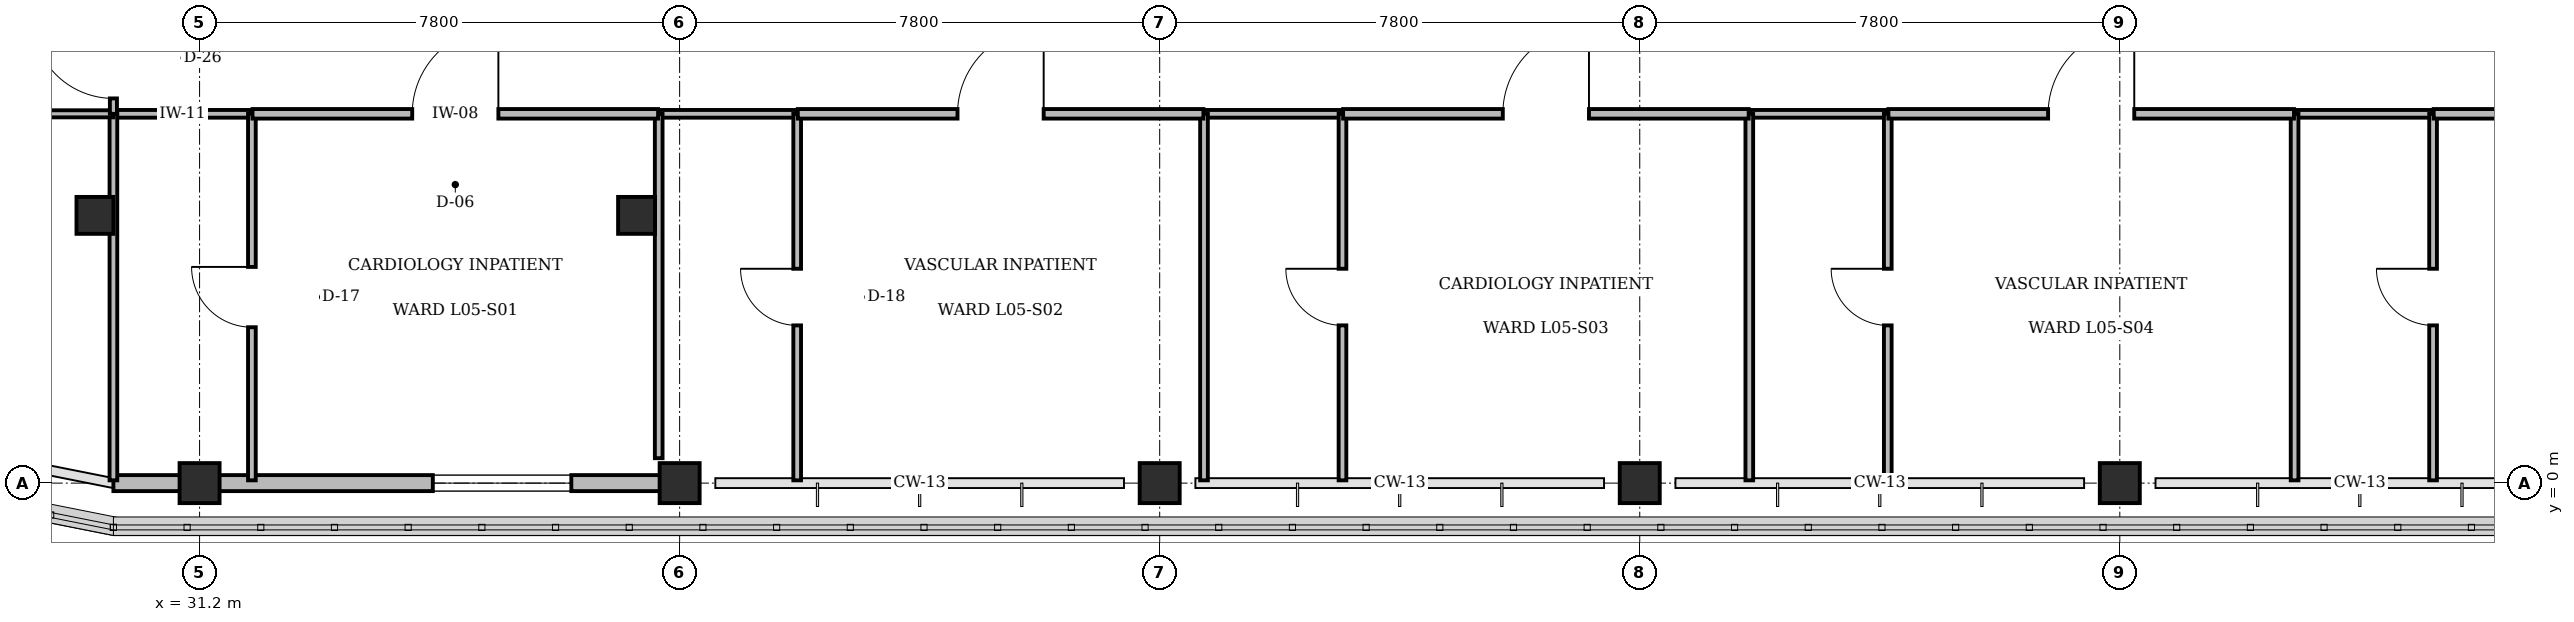
"""IFC4 building model, lengths in metres.
Left out: names, types, materials, properties, quantities, classifications, styles, units other than length and angle.
Written with IfcOpenShell. Run it as: python <this file> out.ifc"""

import sys

from ifc_helpers import new_model, si_unit, direction, frame, frame_2d, origin, origin_2d, place, context, subcontext, project, spatial, rectangle, circle, extrude, element, fill, save


model = new_model("IFC4")
c1 = context("Model", 3, precision=1e-05, world=origin(), true_north=direction((0.0, 1.0)))
c2 = subcontext(c1, "Body", "Model", "MODEL_VIEW")
j1 = project(units=[si_unit("LENGTHUNIT", "METRE"), si_unit("PLANEANGLEUNIT", "RADIAN")], contexts=[c1])
p1 = place(None, origin())
s1 = spatial("IfcSite", under=j1, at=p1, CompositionType="ELEMENT")
p2 = place(p1, origin())
s2 = spatial("IfcBuilding", under=s1, at=p2, CompositionType="ELEMENT")
p3 = place(p2, frame((0.0, 0.0, 22.2)))
s3 = spatial("IfcBuildingStorey", under=s2, at=p3, CompositionType="ELEMENT", Elevation=22.2)
for number, where, z_axis, x_axis in (
    (1, (31.2, 0.0, 0.0), (0.0, 0.0, 1.0), (1.0, 0.0, 0.0)),
    (2, (39.0, 0.0, 0.0), (0.0, 0.0, 1.0), (1.0, 0.0, 0.0)),
    (3, (46.8, 0.0, 0.0), (0.0, 0.0, 1.0), (1.0, 0.0, 0.0)),
    (4, (54.6, 0.0, 0.0), (0.0, 0.0, 1.0), (1.0, 0.0, 0.0)),
    (5, (62.4, 0.0, 0.0), (0.0, 0.0, 1.0), (1.0, 0.0, 0.0)),
):
    element("IfcColumn", number, at=place(p3, frame(where, z_axis=z_axis, x_axis=x_axis)), inside=s3, PredefinedType="COLUMN", context=c2, shape_type="SweptSolid", body=[
        extrude(rectangle(XDim=0.65, YDim=0.65, at=origin_2d()), origin(), (0.0, 0.0, 1.0), 4.2),
    ])
for number, where, z_axis, x_axis in (
    (6, (29.5, 4.35, 0.0), (0.0, 0.0, 1.0), (1.0, 0.0, 0.0)),
    (7, (38.3, 4.35, 0.0), (0.0, 0.0, 1.0), (1.0, 0.0, 0.0)),
):
    element("IfcColumn", number, at=place(p3, frame(where, z_axis=z_axis, x_axis=x_axis)), inside=s3, PredefinedType="PILASTER", context=c2, shape_type="SweptSolid", body=[
        extrude(circle(Radius=0.3, at=origin_2d()), origin(), (0.0, 0.0, 1.0), 4.2),
    ])
p4 = place(p3, frame((38.71, 0.0, 0.0), z_axis=(0.0, 0.0, 1.0), x_axis=(-1.0, 0.0, 0.0)))
e8 = element("IfcWall", 8, at=p4, inside=s3, PredefinedType="STANDARD", context=c2, shape_type="SweptSolid", body=[
    extrude(rectangle(XDim=8.91, YDim=0.26, at=frame_2d((4.455, 0.0))), origin(), (0.0, 0.0, 1.0), 2.805),
])
p5 = place(p4, frame((1.47, 0.0, 0.85)))
e9 = element("IfcOpeningElement", 9, at=p5, cuts=e8, PredefinedType="OPENING", context=c2, shape_type="SweptSolid", body=[
    extrude(rectangle(XDim=2.25, YDim=1.45, at=frame_2d((1.125, 0.725))), frame((0.0, 0.14, 0.0), z_axis=(0.0, -1.0, 0.0), x_axis=(1.0, 0.0, 0.0)), (0.0, 0.0, 1.0), 0.28),
])
p6 = place(p3, frame((29.8, 6.0, 0.0), z_axis=(0.0, 0.0, 1.0), x_axis=(1.0, 0.0, 0.0)))
e10 = element("IfcWall", 10, at=p6, inside=s3, PredefinedType="PARTITIONING", context=c2, shape_type="SweptSolid", body=[
    extrude(rectangle(XDim=2.25, YDim=0.125, at=frame_2d((1.125, 0.0))), origin(), (0.0, 0.0, 1.0), 3.9),
])
p7 = place(p3, frame((29.8, 0.045, 0.0), z_axis=(0.0, 0.0, 1.0), x_axis=(0.0, 1.0, 0.0)))
e11 = element("IfcWall", 11, at=p7, inside=s3, PredefinedType="PARTITIONING", context=c2, shape_type="SweptSolid", body=[
    extrude(rectangle(XDim=5.955, YDim=0.125, at=frame_2d((2.978, 0.0))), origin(), (0.0, 0.0, 1.0), 3.9),
])
p8 = place(p3, frame((32.05, 0.045, 0.0), z_axis=(0.0, 0.0, 1.0), x_axis=(0.0, 1.0, 0.0)))
e12 = element("IfcWall", 12, at=p8, inside=s3, PredefinedType="PARTITIONING", context=c2, shape_type="SweptSolid", body=[
    extrude(rectangle(XDim=5.955, YDim=0.125, at=frame_2d((2.978, 0.0))), origin(), (0.0, 0.0, 1.0), 3.9),
])
p9 = place(p8, frame((2.488, 0.0, 0.0)))
e13 = element("IfcOpeningElement", 13, at=p9, cuts=e12, PredefinedType="OPENING", context=c2, shape_type="SweptSolid", body=[
    extrude(rectangle(XDim=0.98, YDim=2.1, at=frame_2d((0.49, 1.05))), frame((0.0, 0.073, 0.0), z_axis=(0.0, -1.0, 0.0), x_axis=(1.0, 0.0, 0.0)), (0.0, 0.0, 1.0), 0.145),
])
p10 = place(p3, frame((38.66, 6.0, 0.0), z_axis=(0.0, 0.0, 1.0), x_axis=(1.0, 0.0, 0.0)))
e14 = element("IfcWall", 14, at=p10, inside=s3, PredefinedType="PARTITIONING", context=c2, shape_type="SweptSolid", body=[
    extrude(rectangle(XDim=2.25, YDim=0.125, at=frame_2d((1.125, 0.0))), origin(), (0.0, 0.0, 1.0), 3.9),
])
p11 = place(p3, frame((38.66, 0.405, 0.0), z_axis=(0.0, 0.0, 1.0), x_axis=(0.0, 1.0, 0.0)))
e15 = element("IfcWall", 15, at=p11, inside=s3, PredefinedType="PARTITIONING", context=c2, shape_type="SweptSolid", body=[
    extrude(rectangle(XDim=5.595, YDim=0.125, at=frame_2d((2.797, 0.0))), origin(), (0.0, 0.0, 1.0), 3.27),
])
p12 = place(p3, frame((40.91, 0.045, 0.0), z_axis=(0.0, 0.0, 1.0), x_axis=(0.0, 1.0, 0.0)))
e16 = element("IfcWall", 16, at=p12, inside=s3, PredefinedType="PARTITIONING", context=c2, shape_type="SweptSolid", body=[
    extrude(rectangle(XDim=5.955, YDim=0.125, at=frame_2d((2.978, 0.0))), origin(), (0.0, 0.0, 1.0), 3.9),
])
p13 = place(p12, frame((2.518, 0.0, 0.0)))
e17 = element("IfcOpeningElement", 17, at=p13, cuts=e16, PredefinedType="OPENING", context=c2, shape_type="SweptSolid", body=[
    extrude(rectangle(XDim=0.92, YDim=2.1, at=frame_2d((0.46, 1.05))), frame((0.0, 0.073, 0.0), z_axis=(0.0, -1.0, 0.0), x_axis=(1.0, 0.0, 0.0)), (0.0, 0.0, 1.0), 0.145),
])
p14 = place(p3, frame((47.52, 6.0, 0.0), z_axis=(0.0, 0.0, 1.0), x_axis=(1.0, 0.0, 0.0)))
e18 = element("IfcWall", 18, at=p14, inside=s3, PredefinedType="PARTITIONING", context=c2, shape_type="SweptSolid", body=[
    extrude(rectangle(XDim=2.25, YDim=0.125, at=frame_2d((1.125, 0.0))), origin(), (0.0, 0.0, 1.0), 3.9),
])
p15 = place(p3, frame((47.52, 0.045, 0.0), z_axis=(0.0, 0.0, 1.0), x_axis=(0.0, 1.0, 0.0)))
e19 = element("IfcWall", 19, at=p15, inside=s3, PredefinedType="PARTITIONING", context=c2, shape_type="SweptSolid", body=[
    extrude(rectangle(XDim=5.955, YDim=0.125, at=frame_2d((2.978, 0.0))), origin(), (0.0, 0.0, 1.0), 3.9),
])
p16 = place(p3, frame((49.77, 0.045, 0.0), z_axis=(0.0, 0.0, 1.0), x_axis=(0.0, 1.0, 0.0)))
e20 = element("IfcWall", 20, at=p16, inside=s3, PredefinedType="PARTITIONING", context=c2, shape_type="SweptSolid", body=[
    extrude(rectangle(XDim=5.955, YDim=0.125, at=frame_2d((2.978, 0.0))), origin(), (0.0, 0.0, 1.0), 3.9),
])
p17 = place(p16, frame((2.518, 0.0, 0.0)))
e21 = element("IfcOpeningElement", 21, at=p17, cuts=e20, PredefinedType="OPENING", context=c2, shape_type="SweptSolid", body=[
    extrude(rectangle(XDim=0.92, YDim=2.1, at=frame_2d((0.46, 1.05))), frame((0.0, 0.073, 0.0), z_axis=(0.0, -1.0, 0.0), x_axis=(1.0, 0.0, 0.0)), (0.0, 0.0, 1.0), 0.145),
])
p18 = place(p3, frame((56.38, 6.0, 0.0), z_axis=(0.0, 0.0, 1.0), x_axis=(1.0, 0.0, 0.0)))
e22 = element("IfcWall", 22, at=p18, inside=s3, PredefinedType="PARTITIONING", context=c2, shape_type="SweptSolid", body=[
    extrude(rectangle(XDim=2.25, YDim=0.125, at=frame_2d((1.125, 0.0))), origin(), (0.0, 0.0, 1.0), 3.9),
])
p19 = place(p3, frame((56.38, 0.045, 0.0), z_axis=(0.0, 0.0, 1.0), x_axis=(0.0, 1.0, 0.0)))
e23 = element("IfcWall", 23, at=p19, inside=s3, PredefinedType="PARTITIONING", context=c2, shape_type="SweptSolid", body=[
    extrude(rectangle(XDim=5.955, YDim=0.125, at=frame_2d((2.978, 0.0))), origin(), (0.0, 0.0, 1.0), 3.9),
])
p20 = place(p3, frame((58.63, 0.045, 0.0), z_axis=(0.0, 0.0, 1.0), x_axis=(0.0, 1.0, 0.0)))
e24 = element("IfcWall", 24, at=p20, inside=s3, PredefinedType="PARTITIONING", context=c2, shape_type="SweptSolid", body=[
    extrude(rectangle(XDim=5.955, YDim=0.125, at=frame_2d((2.978, 0.0))), origin(), (0.0, 0.0, 1.0), 3.9),
])
p21 = place(p20, frame((2.518, 0.0, 0.0)))
e25 = element("IfcOpeningElement", 25, at=p21, cuts=e24, PredefinedType="OPENING", context=c2, shape_type="SweptSolid", body=[
    extrude(rectangle(XDim=0.92, YDim=2.1, at=frame_2d((0.46, 1.05))), frame((0.0, 0.073, 0.0), z_axis=(0.0, -1.0, 0.0), x_axis=(1.0, 0.0, 0.0)), (0.0, 0.0, 1.0), 0.145),
])
p22 = place(p3, frame((65.24, 6.0, 0.0), z_axis=(0.0, 0.0, 1.0), x_axis=(1.0, 0.0, 0.0)))
e26 = element("IfcWall", 26, at=p22, inside=s3, PredefinedType="PARTITIONING", context=c2, shape_type="SweptSolid", body=[
    extrude(rectangle(XDim=2.25, YDim=0.125, at=frame_2d((1.125, 0.0))), origin(), (0.0, 0.0, 1.0), 3.9),
])
p23 = place(p3, frame((65.24, 0.045, 0.0), z_axis=(0.0, 0.0, 1.0), x_axis=(0.0, 1.0, 0.0)))
e27 = element("IfcWall", 27, at=p23, inside=s3, PredefinedType="PARTITIONING", context=c2, shape_type="SweptSolid", body=[
    extrude(rectangle(XDim=5.955, YDim=0.125, at=frame_2d((2.978, 0.0))), origin(), (0.0, 0.0, 1.0), 3.9),
])
p24 = place(p3, frame((67.49, 0.045, 0.0), z_axis=(0.0, 0.0, 1.0), x_axis=(0.0, 1.0, 0.0)))
e28 = element("IfcWall", 28, at=p24, inside=s3, PredefinedType="PARTITIONING", context=c2, shape_type="SweptSolid", body=[
    extrude(rectangle(XDim=5.955, YDim=0.125, at=frame_2d((2.978, 0.0))), origin(), (0.0, 0.0, 1.0), 3.9),
])
p25 = place(p24, frame((2.518, 0.0, 0.0)))
e29 = element("IfcOpeningElement", 29, at=p25, cuts=e28, PredefinedType="OPENING", context=c2, shape_type="SweptSolid", body=[
    extrude(rectangle(XDim=0.92, YDim=2.1, at=frame_2d((0.46, 1.05))), frame((0.0, 0.073, 0.0), z_axis=(0.0, -1.0, 0.0), x_axis=(1.0, 0.0, 0.0)), (0.0, 0.0, 1.0), 0.145),
])
p26 = place(p3, frame((17.7, 6.0, 0.0), z_axis=(0.0, 0.0, 1.0), x_axis=(1.0, 0.0, 0.0)))
e30 = element("IfcWall", 30, at=p26, inside=s3, PredefinedType="PARTITIONING", context=c2, shape_type="SweptSolid", body=[
    extrude(rectangle(XDim=12.1, YDim=0.115, at=frame_2d((6.05, 0.0))), origin(), (0.0, 0.0, 1.0), 3.9),
])
p27 = place(p3, frame((29.8, 6.0, 0.0), z_axis=(0.0, 0.0, 1.0), x_axis=(0.0, 1.0, 0.0)))
e31 = element("IfcWall", 31, at=p27, inside=s3, PredefinedType="PARTITIONING", context=c2, shape_type="SweptSolid", body=[
    extrude(rectangle(XDim=13.2, YDim=0.115, at=frame_2d((6.6, 0.0))), origin(), (0.0, 0.0, 1.0), 3.9),
])
p28 = place(p27, frame((0.25, 0.0, 0.0)))
e32 = element("IfcOpeningElement", 32, at=p28, cuts=e31, PredefinedType="OPENING", context=c2, shape_type="SweptSolid", body=[
    extrude(rectangle(XDim=1.32, YDim=2.15, at=frame_2d((0.66, 1.075))), frame((0.0, 0.067, 0.0), z_axis=(0.0, -1.0, 0.0), x_axis=(1.0, 0.0, 0.0)), (0.0, 0.0, 1.0), 0.135),
])
p29 = place(p3, frame((32.06, 6.0, 0.0), z_axis=(0.0, 0.0, 1.0), x_axis=(1.0, 0.0, 0.0)))
e33 = element("IfcWall", 33, at=p29, inside=s3, PredefinedType="PARTITIONING", context=c2, shape_type="SweptSolid", body=[
    extrude(rectangle(XDim=6.59, YDim=0.155, at=frame_2d((3.295, 0.0))), origin(), (0.0, 0.0, 1.0), 3.9),
])
p30 = place(p29, frame((2.595, 0.0, 0.0)))
e34 = element("IfcOpeningElement", 34, at=p30, cuts=e33, PredefinedType="OPENING", context=c2, shape_type="SweptSolid", body=[
    extrude(rectangle(XDim=1.4, YDim=2.2, at=frame_2d((0.7, 1.1))), frame((0.0, 0.087, 0.0), z_axis=(0.0, -1.0, 0.0), x_axis=(1.0, 0.0, 0.0)), (0.0, 0.0, 1.0), 0.175),
])
p31 = place(p3, frame((40.92, 6.0, 0.0), z_axis=(0.0, 0.0, 1.0), x_axis=(1.0, 0.0, 0.0)))
e35 = element("IfcWall", 35, at=p31, inside=s3, PredefinedType="PARTITIONING", context=c2, shape_type="SweptSolid", body=[
    extrude(rectangle(XDim=6.59, YDim=0.155, at=frame_2d((3.295, 0.0))), origin(), (0.0, 0.0, 1.0), 3.9),
])
p32 = place(p31, frame((2.595, 0.0, 0.0)))
e36 = element("IfcOpeningElement", 36, at=p32, cuts=e35, PredefinedType="OPENING", context=c2, shape_type="SweptSolid", body=[
    extrude(rectangle(XDim=1.4, YDim=2.2, at=frame_2d((0.7, 1.1))), frame((0.0, 0.087, 0.0), z_axis=(0.0, -1.0, 0.0), x_axis=(1.0, 0.0, 0.0)), (0.0, 0.0, 1.0), 0.175),
])
p33 = place(p3, frame((49.78, 6.0, 0.0), z_axis=(0.0, 0.0, 1.0), x_axis=(1.0, 0.0, 0.0)))
e37 = element("IfcWall", 37, at=p33, inside=s3, PredefinedType="PARTITIONING", context=c2, shape_type="SweptSolid", body=[
    extrude(rectangle(XDim=6.59, YDim=0.155, at=frame_2d((3.295, 0.0))), origin(), (0.0, 0.0, 1.0), 3.9),
])
p34 = place(p33, frame((2.595, 0.0, 0.0)))
e38 = element("IfcOpeningElement", 38, at=p34, cuts=e37, PredefinedType="OPENING", context=c2, shape_type="SweptSolid", body=[
    extrude(rectangle(XDim=1.4, YDim=2.2, at=frame_2d((0.7, 1.1))), frame((0.0, 0.087, 0.0), z_axis=(0.0, -1.0, 0.0), x_axis=(1.0, 0.0, 0.0)), (0.0, 0.0, 1.0), 0.175),
])
p35 = place(p3, frame((58.64, 6.0, 0.0), z_axis=(0.0, 0.0, 1.0), x_axis=(1.0, 0.0, 0.0)))
e39 = element("IfcWall", 39, at=p35, inside=s3, PredefinedType="PARTITIONING", context=c2, shape_type="SweptSolid", body=[
    extrude(rectangle(XDim=6.59, YDim=0.155, at=frame_2d((3.295, 0.0))), origin(), (0.0, 0.0, 1.0), 3.9),
])
p36 = place(p35, frame((2.595, 0.0, 0.0)))
e40 = element("IfcOpeningElement", 40, at=p36, cuts=e39, PredefinedType="OPENING", context=c2, shape_type="SweptSolid", body=[
    extrude(rectangle(XDim=1.4, YDim=2.2, at=frame_2d((0.7, 1.1))), frame((0.0, 0.087, 0.0), z_axis=(0.0, -1.0, 0.0), x_axis=(1.0, 0.0, 0.0)), (0.0, 0.0, 1.0), 0.175),
])
p37 = place(p3, frame((67.5, 6.0, 0.0), z_axis=(0.0, 0.0, 1.0), x_axis=(1.0, 0.0, 0.0)))
e41 = element("IfcWall", 41, at=p37, inside=s3, PredefinedType="PARTITIONING", context=c2, shape_type="SweptSolid", body=[
    extrude(rectangle(XDim=6.59, YDim=0.155, at=frame_2d((3.295, 0.0))), origin(), (0.0, 0.0, 1.0), 3.9),
])
p38 = place(p37, frame((2.595, 0.0, 0.0)))
e42 = element("IfcOpeningElement", 42, at=p38, cuts=e41, PredefinedType="OPENING", context=c2, shape_type="SweptSolid", body=[
    extrude(rectangle(XDim=1.4, YDim=2.2, at=frame_2d((0.7, 1.1))), frame((0.0, 0.087, 0.0), z_axis=(0.0, -1.0, 0.0), x_axis=(1.0, 0.0, 0.0)), (0.0, 0.0, 1.0), 0.175),
])
p39 = place(p5, origin())
e43 = element("IfcWindow", 43, at=p39, inside=s3, PartitioningType="SINGLE_PANEL", PredefinedType="WINDOW", context=c2, shape_type="SweptSolid", body=[
    extrude(rectangle(XDim=2.25, YDim=1.45, at=frame_2d((1.125, 0.725))), frame((0.0, 0.03, 0.0), z_axis=(0.0, -1.0, 0.0), x_axis=(1.0, 0.0, 0.0)), (0.0, 0.0, 1.0), 0.06),
])
fill(e9, e43)
p40 = place(p9, origin())
e44 = element("IfcDoor", 44, at=p40, inside=s3, OperationType="SINGLE_SWING_RIGHT", PredefinedType="DOOR", context=c2, shape_type="SweptSolid", body=[
    extrude(rectangle(XDim=0.98, YDim=2.1, at=frame_2d((0.49, 1.05))), frame((0.0, 0.025, 0.0), z_axis=(0.0, -1.0, 0.0), x_axis=(1.0, 0.0, 0.0)), (0.0, 0.0, 1.0), 0.05),
])
fill(e13, e44)
p41 = place(p13, origin())
e45 = element("IfcDoor", 45, at=p41, inside=s3, OperationType="SINGLE_SWING_RIGHT", PredefinedType="DOOR", context=c2, shape_type="SweptSolid", body=[
    extrude(rectangle(XDim=0.92, YDim=2.1, at=frame_2d((0.46, 1.05))), frame((0.0, 0.025, 0.0), z_axis=(0.0, -1.0, 0.0), x_axis=(1.0, 0.0, 0.0)), (0.0, 0.0, 1.0), 0.05),
])
fill(e17, e45)
p42 = place(p17, origin())
e46 = element("IfcDoor", 46, at=p42, inside=s3, OperationType="SINGLE_SWING_RIGHT", PredefinedType="DOOR", context=c2, shape_type="SweptSolid", body=[
    extrude(rectangle(XDim=0.92, YDim=2.1, at=frame_2d((0.46, 1.05))), frame((0.0, 0.025, 0.0), z_axis=(0.0, -1.0, 0.0), x_axis=(1.0, 0.0, 0.0)), (0.0, 0.0, 1.0), 0.05),
])
fill(e21, e46)
p43 = place(p21, origin())
e47 = element("IfcDoor", 47, at=p43, inside=s3, OperationType="SINGLE_SWING_RIGHT", PredefinedType="DOOR", context=c2, shape_type="SweptSolid", body=[
    extrude(rectangle(XDim=0.92, YDim=2.1, at=frame_2d((0.46, 1.05))), frame((0.0, 0.025, 0.0), z_axis=(0.0, -1.0, 0.0), x_axis=(1.0, 0.0, 0.0)), (0.0, 0.0, 1.0), 0.05),
])
fill(e25, e47)
p44 = place(p25, origin())
e48 = element("IfcDoor", 48, at=p44, inside=s3, OperationType="SINGLE_SWING_RIGHT", PredefinedType="DOOR", context=c2, shape_type="SweptSolid", body=[
    extrude(rectangle(XDim=0.92, YDim=2.1, at=frame_2d((0.46, 1.05))), frame((0.0, 0.025, 0.0), z_axis=(0.0, -1.0, 0.0), x_axis=(1.0, 0.0, 0.0)), (0.0, 0.0, 1.0), 0.05),
])
fill(e29, e48)
p45 = place(p28, origin())
e49 = element("IfcDoor", 49, at=p45, inside=s3, OperationType="SINGLE_SWING_RIGHT", PredefinedType="DOOR", context=c2, shape_type="SweptSolid", body=[
    extrude(rectangle(XDim=1.32, YDim=2.15, at=frame_2d((0.66, 1.075))), frame((0.0, 0.025, 0.0), z_axis=(0.0, -1.0, 0.0), x_axis=(1.0, 0.0, 0.0)), (0.0, 0.0, 1.0), 0.05),
])
fill(e32, e49)
p46 = place(p30, origin())
e50 = element("IfcDoor", 50, at=p46, inside=s3, OperationType="SINGLE_SWING_RIGHT", PredefinedType="DOOR", context=c2, shape_type="SweptSolid", body=[
    extrude(rectangle(XDim=1.4, YDim=2.2, at=frame_2d((0.7, 1.1))), frame((0.0, 0.025, 0.0), z_axis=(0.0, -1.0, 0.0), x_axis=(1.0, 0.0, 0.0)), (0.0, 0.0, 1.0), 0.05),
])
fill(e34, e50)
p47 = place(p32, origin())
e51 = element("IfcDoor", 51, at=p47, inside=s3, OperationType="SINGLE_SWING_RIGHT", PredefinedType="DOOR", context=c2, shape_type="SweptSolid", body=[
    extrude(rectangle(XDim=1.4, YDim=2.2, at=frame_2d((0.7, 1.1))), frame((0.0, 0.025, 0.0), z_axis=(0.0, -1.0, 0.0), x_axis=(1.0, 0.0, 0.0)), (0.0, 0.0, 1.0), 0.05),
])
fill(e36, e51)
p48 = place(p34, origin())
e52 = element("IfcDoor", 52, at=p48, inside=s3, OperationType="SINGLE_SWING_RIGHT", PredefinedType="DOOR", context=c2, shape_type="SweptSolid", body=[
    extrude(rectangle(XDim=1.4, YDim=2.2, at=frame_2d((0.7, 1.1))), frame((0.0, 0.025, 0.0), z_axis=(0.0, -1.0, 0.0), x_axis=(1.0, 0.0, 0.0)), (0.0, 0.0, 1.0), 0.05),
])
fill(e38, e52)
p49 = place(p36, origin())
e53 = element("IfcDoor", 53, at=p49, inside=s3, OperationType="SINGLE_SWING_RIGHT", PredefinedType="DOOR", context=c2, shape_type="SweptSolid", body=[
    extrude(rectangle(XDim=1.4, YDim=2.2, at=frame_2d((0.7, 1.1))), frame((0.0, 0.025, 0.0), z_axis=(0.0, -1.0, 0.0), x_axis=(1.0, 0.0, 0.0)), (0.0, 0.0, 1.0), 0.05),
])
fill(e40, e53)
save(model, sys.argv[1])
